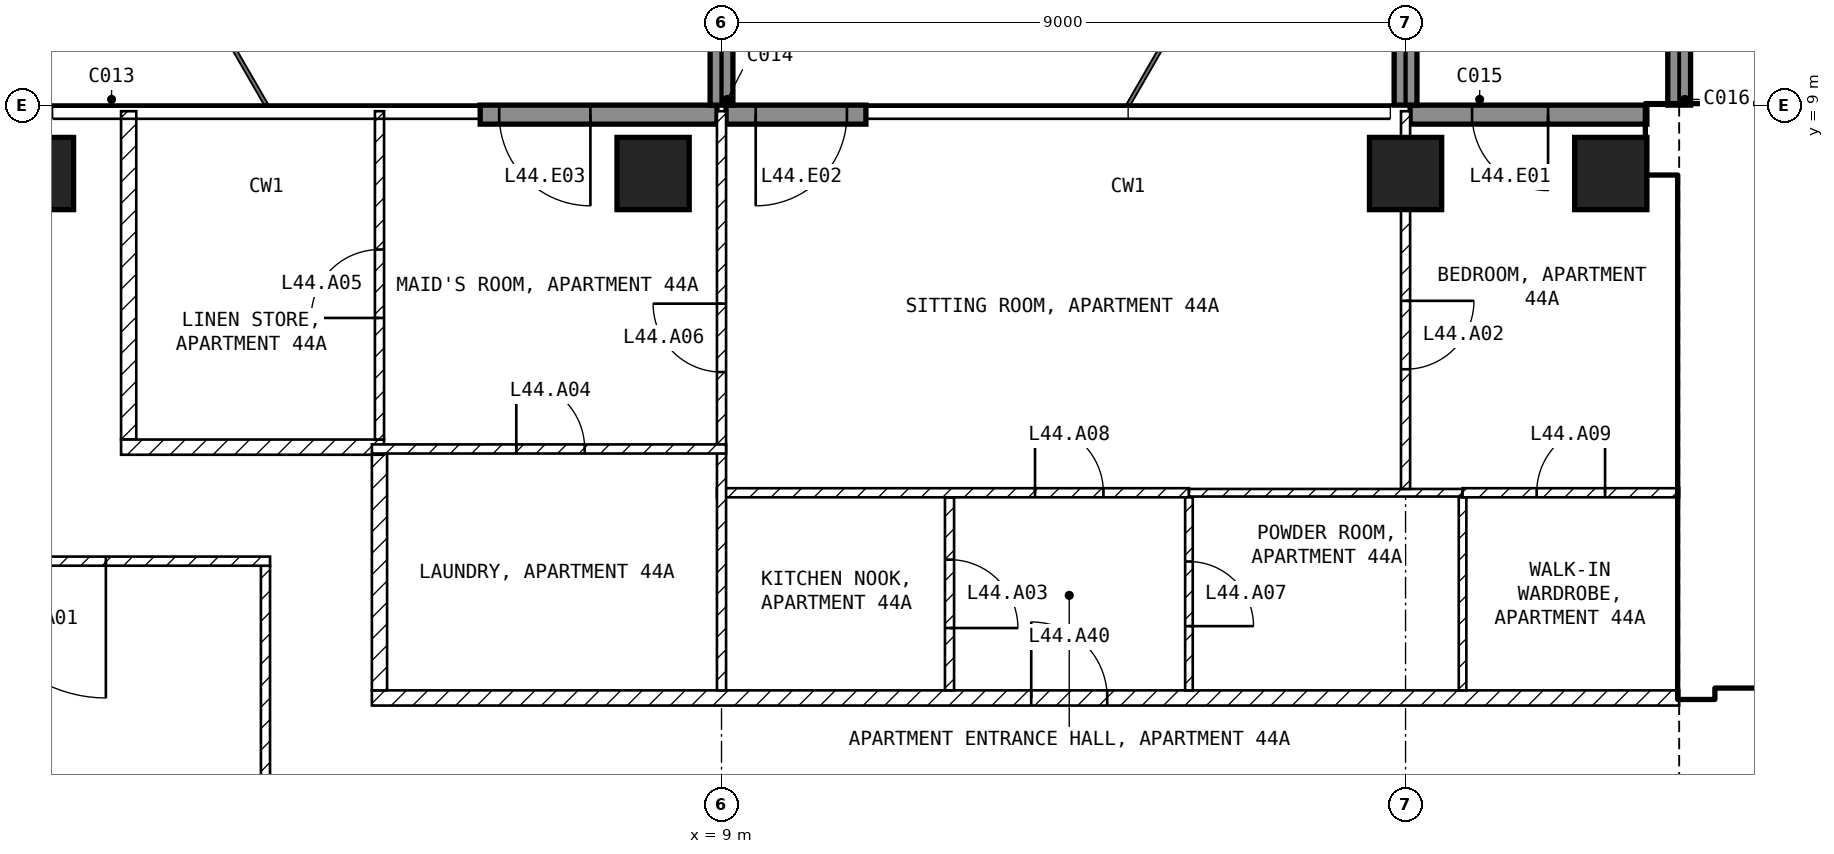
"""IFC4 building model, lengths in metres.
Left out: names, types, materials, properties, quantities, classifications, styles, units other than length and angle.
Written with IfcOpenShell. Run it as: python <this file> out.ifc"""

import sys

from ifc_helpers import new_model, si_unit, direction, frame, frame_2d, origin, origin_2d, place, context, subcontext, project, spatial, rectangle, extrude, element, fill, save


model = new_model("IFC4")
c1 = context("Model", 3, precision=1e-05, world=origin(), true_north=direction((0.0, 1.0)))
c2 = subcontext(c1, "Body", "Model", "MODEL_VIEW")
j1 = project(units=[si_unit("LENGTHUNIT", "METRE"), si_unit("PLANEANGLEUNIT", "RADIAN")], contexts=[c1])
p1 = place(None, origin())
s1 = spatial("IfcSite", under=j1, at=p1, CompositionType="ELEMENT")
p2 = place(p1, origin())
s2 = spatial("IfcBuilding", under=s1, at=p2, CompositionType="ELEMENT")
p3 = place(p2, frame((0.0, 0.0, 180.6)))
s3 = spatial("IfcBuildingStorey", under=s2, at=p3, CompositionType="ELEMENT", Elevation=180.6)
for number, where, z_axis, x_axis in (
    (1, (0.0, 8.1, -0.25), (0.0, 0.0, 1.0), (1.0, 0.0, 0.0)),
    (2, (8.1, 8.1, -0.25), (0.0, 0.0, 1.0), (1.0, 0.0, 0.0)),
    (3, (18.0, 8.1, -0.25), (0.0, 0.0, 1.0), (1.0, 0.0, 0.0)),
    (4, (20.7, 8.1, -0.25), (0.0, 0.0, 1.0), (1.0, 0.0, 0.0)),
):
    element("IfcColumn", number, at=place(p3, frame(where, z_axis=z_axis, x_axis=x_axis)), inside=s3, PredefinedType="COLUMN", context=c2, shape_type="SweptSolid", body=[
        extrude(rectangle(XDim=0.95, YDim=0.95, at=origin_2d()), origin(), (0.0, 0.0, 1.0), 3.5),
    ])
p4 = place(p3, frame((21.175, 8.875, 0.0), z_axis=(0.0, 0.0, 1.0), x_axis=(-1.0, 0.0, 0.0)))
e5 = element("IfcWall", 5, at=p4, inside=s3, PredefinedType="SOLIDWALL", context=c2, shape_type="SweptSolid", body=[
    extrude(rectangle(XDim=3.115, YDim=0.25, at=frame_2d((1.558, 0.0))), origin(), (0.0, 0.0, 1.0), 3.25),
])
p5 = place(p4, frame((1.3, 0.0, 0.0)))
e6 = element("IfcOpeningElement", 6, at=p5, cuts=e5, PredefinedType="OPENING", context=c2, shape_type="SweptSolid", body=[
    extrude(rectangle(XDim=1.0, YDim=2.4, at=frame_2d((0.5, 1.2))), frame((0.0, 0.135, 0.0), z_axis=(0.0, -1.0, 0.0), x_axis=(1.0, 0.0, 0.0)), (0.0, 0.0, 1.0), 0.27),
])
p6 = place(p3, frame((10.9, 8.875, 0.0), z_axis=(0.0, 0.0, 1.0), x_axis=(-1.0, 0.0, 0.0)))
e7 = element("IfcWall", 7, at=p6, inside=s3, PredefinedType="SOLIDWALL", context=c2, shape_type="SweptSolid", body=[
    extrude(rectangle(XDim=1.84, YDim=0.25, at=frame_2d((0.92, 0.0))), origin(), (0.0, 0.0, 1.0), 3.25),
])
p7 = place(p6, frame((0.25, 0.0, 0.0)))
e8 = element("IfcOpeningElement", 8, at=p7, cuts=e7, PredefinedType="OPENING", context=c2, shape_type="SweptSolid", body=[
    extrude(rectangle(XDim=1.2, YDim=2.4, at=frame_2d((0.6, 1.2))), frame((0.0, 0.135, 0.0), z_axis=(0.0, -1.0, 0.0), x_axis=(1.0, 0.0, 0.0)), (0.0, 0.0, 1.0), 0.27),
])
p8 = place(p3, frame((8.94, 8.875, 0.0), z_axis=(0.0, 0.0, 1.0), x_axis=(-1.0, 0.0, 0.0)))
e9 = element("IfcWall", 9, at=p8, inside=s3, PredefinedType="SOLIDWALL", context=c2, shape_type="SweptSolid", body=[
    extrude(rectangle(XDim=3.115, YDim=0.25, at=frame_2d((1.558, 0.0))), origin(), (0.0, 0.0, 1.0), 3.25),
])
p9 = place(p8, frame((1.665, 0.0, 0.0)))
e10 = element("IfcOpeningElement", 10, at=p9, cuts=e9, PredefinedType="OPENING", context=c2, shape_type="SweptSolid", body=[
    extrude(rectangle(XDim=1.2, YDim=2.4, at=frame_2d((0.6, 1.2))), frame((0.0, 0.135, 0.0), z_axis=(0.0, -1.0, 0.0), x_axis=(1.0, 0.0, 0.0)), (0.0, 0.0, 1.0), 0.27),
])
for number, where, z_axis, x_axis in (
    (11, (9.0, 9.0, 0.0), (0.0, 0.0, 1.0), (0.0, 1.0, 0.0)),
    (12, (18.0, 9.0, 0.0), (0.0, 0.0, 1.0), (0.0, 1.0, 0.0)),
    (13, (21.6, 9.0, 0.0), (0.0, 0.0, 1.0), (0.0, 1.0, 0.0)),
):
    element("IfcWall", number, at=place(p3, frame(where, z_axis=z_axis, x_axis=x_axis)), inside=s3, PredefinedType="SOLIDWALL", context=c2, shape_type="SweptSolid", body=[
        extrude(rectangle(XDim=2.7, YDim=0.3, at=frame_2d((1.35, 0.0))), origin(), (0.0, 0.0, 1.0), 3.25),
    ])
p10 = place(p3, frame((21.175, 8.55, 0.0), z_axis=(0.0, 0.0, 1.0), x_axis=(1.0, 0.0, 0.0)))
e14 = element("IfcWall", 14, at=p10, inside=s3, PredefinedType="SHEAR", context=c2, shape_type="SweptSolid", body=[
    extrude(rectangle(XDim=8.425, YDim=0.9, at=frame_2d((4.212, 0.0))), origin(), (0.0, 0.0, 1.0), 3.25),
])
p11 = place(p3, frame((21.825, 1.2, 0.0), z_axis=(0.0, 0.0, 1.0), x_axis=(0.0, 1.0, 0.0)))
e15 = element("IfcWall", 15, at=p11, inside=s3, PredefinedType="SHEAR", context=c2, shape_type="SweptSolid", body=[
    extrude(rectangle(XDim=6.9, YDim=0.45, at=frame_2d((3.45, 0.0))), origin(), (0.0, 0.0, 1.0), 3.25),
])
p12 = place(p3, frame((22.05, 1.45, 0.0), z_axis=(0.0, 0.0, 1.0), x_axis=(1.0, 0.0, 0.0)))
e16 = element("IfcWall", 16, at=p12, inside=s3, PredefinedType="SOLIDWALL", context=c2, shape_type="SweptSolid", body=[
    extrude(rectangle(XDim=11.15, YDim=0.2, at=frame_2d((5.575, 0.0))), origin(), (0.0, 0.0, 1.0), 3.25),
])
p13 = place(p12, frame((0.75, 0.0, 0.0)))
e17 = element("IfcOpeningElement", 17, at=p13, cuts=e16, PredefinedType="OPENING", context=c2, shape_type="SweptSolid", body=[
    extrude(rectangle(XDim=1.0, YDim=2.1, at=frame_2d((0.5, 1.05))), frame((0.0, 0.11, 0.0), z_axis=(0.0, -1.0, 0.0), x_axis=(1.0, 0.0, 0.0)), (0.0, 0.0, 1.0), 0.22),
])
p14 = place(p12, frame((3.25, 0.0, 0.0)))
e18 = element("IfcOpeningElement", 18, at=p14, cuts=e16, PredefinedType="OPENING", context=c2, shape_type="SweptSolid", body=[
    extrude(rectangle(XDim=1.0, YDim=2.1, at=frame_2d((0.5, 1.05))), frame((0.0, 0.11, 0.0), z_axis=(0.0, -1.0, 0.0), x_axis=(1.0, 0.0, 0.0)), (0.0, 0.0, 1.0), 0.22),
])
p15 = place(p12, frame((9.15, 0.0, 0.0)))
e19 = element("IfcOpeningElement", 19, at=p15, cuts=e16, PredefinedType="OPENING", context=c2, shape_type="SweptSolid", body=[
    extrude(rectangle(XDim=0.9, YDim=2.1, at=frame_2d((0.45, 1.05))), frame((0.0, 0.11, 0.0), z_axis=(0.0, -1.0, 0.0), x_axis=(1.0, 0.0, 0.0)), (0.0, 0.0, 1.0), 0.22),
])
p16 = place(p3, frame((22.05, 5.15, 0.0), z_axis=(0.0, 0.0, 1.0), x_axis=(1.0, 0.0, 0.0)))
e20 = element("IfcWall", 20, at=p16, inside=s3, PredefinedType="SOLIDWALL", context=c2, shape_type="SweptSolid", body=[
    extrude(rectangle(XDim=6.3, YDim=0.2, at=frame_2d((3.15, 0.0))), origin(), (0.0, 0.0, 1.0), 3.25),
])
p17 = place(p16, frame((0.2, 0.0, 0.0)))
e21 = element("IfcOpeningElement", 21, at=p17, cuts=e20, PredefinedType="OPENING", context=c2, shape_type="SweptSolid", body=[
    extrude(rectangle(XDim=1.0, YDim=2.1, at=frame_2d((0.5, 1.05))), frame((0.0, 0.11, 0.0), z_axis=(0.0, -1.0, 0.0), x_axis=(1.0, 0.0, 0.0)), (0.0, 0.0, 1.0), 0.22),
])
p18 = place(p3, frame((3.0, -2.94, 0.0), z_axis=(0.0, 0.0, 1.0), x_axis=(0.0, 1.0, 0.0)))
e22 = element("IfcWall", 22, at=p18, inside=s3, PredefinedType="PARTITIONING", context=c2, shape_type="SweptSolid", body=[
    extrude(rectangle(XDim=5.88, YDim=0.12, at=frame_2d((2.94, 0.0))), origin(), (0.0, 0.0, 1.0), 3.25),
])
p19 = place(p3, frame((3.06, 3.0, 0.0), z_axis=(0.0, 0.0, 1.0), x_axis=(-1.0, 0.0, 0.0)))
e23 = element("IfcWall", 23, at=p19, inside=s3, PredefinedType="PARTITIONING", context=c2, shape_type="SweptSolid", body=[
    extrude(rectangle(XDim=6.12, YDim=0.12, at=frame_2d((3.06, 0.0))), origin(), (0.0, 0.0, 1.0), 3.25),
])
p20 = place(p19, frame((2.16, 0.0, 0.0)))
e24 = element("IfcOpeningElement", 24, at=p20, cuts=e23, PredefinedType="OPENING", context=c2, shape_type="SweptSolid", body=[
    extrude(rectangle(XDim=1.8, YDim=2.1, at=frame_2d((0.9, 1.05))), frame((0.0, 0.07, 0.0), z_axis=(0.0, -1.0, 0.0), x_axis=(1.0, 0.0, 0.0)), (0.0, 0.0, 1.0), 0.14),
])
p21 = place(p3, frame((4.4, 1.2, 0.0), z_axis=(0.0, 0.0, 1.0), x_axis=(1.0, 0.0, 0.0)))
e25 = element("IfcWall", 25, at=p21, inside=s3, PredefinedType="PARTITIONING", context=c2, shape_type="SweptSolid", body=[
    extrude(rectangle(XDim=17.2, YDim=0.2, at=frame_2d((8.6, 0.0))), origin(), (0.0, 0.0, 1.0), 3.25),
])
p22 = place(p21, frame((8.675, 0.0, 0.0)))
e26 = element("IfcOpeningElement", 26, at=p22, cuts=e25, PredefinedType="OPENING", context=c2, shape_type="SweptSolid", body=[
    extrude(rectangle(XDim=1.0, YDim=2.1, at=frame_2d((0.5, 1.05))), frame((0.0, 0.11, 0.0), z_axis=(0.0, -1.0, 0.0), x_axis=(1.0, 0.0, 0.0)), (0.0, 0.0, 1.0), 0.22),
])
p23 = place(p3, frame((4.5, 4.416, 0.0), z_axis=(0.0, 0.0, 1.0), x_axis=(0.0, -1.0, 0.0)))
e27 = element("IfcWall", 27, at=p23, inside=s3, PredefinedType="PARTITIONING", context=c2, shape_type="SweptSolid", body=[
    extrude(rectangle(XDim=3.116, YDim=0.2, at=frame_2d((1.558, 0.0))), origin(), (0.0, 0.0, 1.0), 3.25),
])
p24 = place(p3, frame((1.2, 8.92, 0.0), z_axis=(0.0, 0.0, 1.0), x_axis=(0.0, -1.0, 0.0)))
e28 = element("IfcWall", 28, at=p24, inside=s3, PredefinedType="PARTITIONING", context=c2, shape_type="SweptSolid", body=[
    extrude(rectangle(XDim=4.32, YDim=0.2, at=frame_2d((2.16, 0.0))), origin(), (0.0, 0.0, 1.0), 3.25),
])
p25 = place(p3, frame((1.1, 4.5, 0.0), z_axis=(0.0, 0.0, 1.0), x_axis=(1.0, 0.0, 0.0)))
e29 = element("IfcWall", 29, at=p25, inside=s3, PredefinedType="PARTITIONING", context=c2, shape_type="SweptSolid", body=[
    extrude(rectangle(XDim=3.46, YDim=0.2, at=frame_2d((1.73, 0.0))), origin(), (0.0, 0.0, 1.0), 3.25),
])
p26 = place(p3, frame((12.0, 3.84, 0.0), z_axis=(0.0, 0.0, 1.0), x_axis=(0.0, -1.0, 0.0)))
e30 = element("IfcWall", 30, at=p26, inside=s3, PredefinedType="PARTITIONING", context=c2, shape_type="SweptSolid", body=[
    extrude(rectangle(XDim=2.54, YDim=0.12, at=frame_2d((1.27, 0.0))), origin(), (0.0, 0.0, 1.0), 3.25),
])
p27 = place(p26, frame((0.82, 0.0, 0.0)))
e31 = element("IfcOpeningElement", 31, at=p27, cuts=e30, PredefinedType="OPENING", context=c2, shape_type="SweptSolid", body=[
    extrude(rectangle(XDim=0.9, YDim=2.1, at=frame_2d((0.45, 1.05))), frame((0.0, 0.07, 0.0), z_axis=(0.0, -1.0, 0.0), x_axis=(1.0, 0.0, 0.0)), (0.0, 0.0, 1.0), 0.14),
])
p28 = place(p3, frame((8.94, 3.9, 0.0), z_axis=(0.0, 0.0, 1.0), x_axis=(1.0, 0.0, 0.0)))
e32 = element("IfcWall", 32, at=p28, inside=s3, PredefinedType="PARTITIONING", context=c2, shape_type="SweptSolid", body=[
    extrude(rectangle(XDim=6.21, YDim=0.12, at=frame_2d((3.105, 0.0))), origin(), (0.0, 0.0, 1.0), 3.25),
])
p29 = place(p28, frame((4.185, 0.0, 0.0)))
e33 = element("IfcOpeningElement", 33, at=p29, cuts=e32, PredefinedType="OPENING", context=c2, shape_type="SweptSolid", body=[
    extrude(rectangle(XDim=0.9, YDim=2.1, at=frame_2d((0.45, 1.05))), frame((0.0, 0.07, 0.0), z_axis=(0.0, -1.0, 0.0), x_axis=(1.0, 0.0, 0.0)), (0.0, 0.0, 1.0), 0.14),
])
p30 = place(p3, frame((9.0, 1.3, 0.0), z_axis=(0.0, 0.0, 1.0), x_axis=(0.0, 1.0, 0.0)))
e34 = element("IfcWall", 34, at=p30, inside=s3, PredefinedType="PARTITIONING", context=c2, shape_type="SweptSolid", body=[
    extrude(rectangle(XDim=7.62, YDim=0.12, at=frame_2d((3.81, 0.0))), origin(), (0.0, 0.0, 1.0), 3.25),
])
p31 = place(p30, frame((4.188, 0.0, 0.0)))
e35 = element("IfcOpeningElement", 35, at=p31, cuts=e34, PredefinedType="OPENING", context=c2, shape_type="SweptSolid", body=[
    extrude(rectangle(XDim=0.9, YDim=2.1, at=frame_2d((0.45, 1.05))), frame((0.0, 0.07, 0.0), z_axis=(0.0, -1.0, 0.0), x_axis=(1.0, 0.0, 0.0)), (0.0, 0.0, 1.0), 0.14),
])
p32 = place(p3, frame((15.15, 3.84, 0.0), z_axis=(0.0, 0.0, 1.0), x_axis=(0.0, -1.0, 0.0)))
e36 = element("IfcWall", 36, at=p32, inside=s3, PredefinedType="PARTITIONING", context=c2, shape_type="SweptSolid", body=[
    extrude(rectangle(XDim=2.54, YDim=0.1, at=frame_2d((1.27, 0.0))), origin(), (0.0, 0.0, 1.0), 3.25),
])
p33 = place(p32, frame((0.845, 0.0, 0.0)))
e37 = element("IfcOpeningElement", 37, at=p33, cuts=e36, PredefinedType="OPENING", context=c2, shape_type="SweptSolid", body=[
    extrude(rectangle(XDim=0.85, YDim=2.1, at=frame_2d((0.425, 1.05))), frame((0.0, 0.06, 0.0), z_axis=(0.0, -1.0, 0.0), x_axis=(1.0, 0.0, 0.0)), (0.0, 0.0, 1.0), 0.12),
])
p34 = place(p3, frame((18.75, 3.84, 0.0), z_axis=(0.0, 0.0, 1.0), x_axis=(0.0, -1.0, 0.0)))
e38 = element("IfcWall", 38, at=p34, inside=s3, PredefinedType="PARTITIONING", context=c2, shape_type="SweptSolid", body=[
    extrude(rectangle(XDim=2.54, YDim=0.1, at=frame_2d((1.27, 0.0))), origin(), (0.0, 0.0, 1.0), 3.25),
])
p35 = place(p3, frame((15.15, 3.9, 0.0), z_axis=(0.0, 0.0, 1.0), x_axis=(1.0, 0.0, 0.0)))
e39 = element("IfcWall", 39, at=p35, inside=s3, PredefinedType="PARTITIONING", context=c2, shape_type="SweptSolid", body=[
    extrude(rectangle(XDim=3.6, YDim=0.1, at=frame_2d((1.8, 0.0))), origin(), (0.0, 0.0, 1.0), 3.25),
])
p36 = place(p3, frame((18.75, 3.9, 0.0), z_axis=(0.0, 0.0, 1.0), x_axis=(1.0, 0.0, 0.0)))
e40 = element("IfcWall", 40, at=p36, inside=s3, PredefinedType="PARTITIONING", context=c2, shape_type="SweptSolid", body=[
    extrude(rectangle(XDim=2.85, YDim=0.12, at=frame_2d((1.425, 0.0))), origin(), (0.0, 0.0, 1.0), 3.25),
])
p37 = place(p36, frame((0.975, 0.0, 0.0)))
e41 = element("IfcOpeningElement", 41, at=p37, cuts=e40, PredefinedType="OPENING", context=c2, shape_type="SweptSolid", body=[
    extrude(rectangle(XDim=0.9, YDim=2.1, at=frame_2d((0.45, 1.05))), frame((0.0, 0.07, 0.0), z_axis=(0.0, -1.0, 0.0), x_axis=(1.0, 0.0, 0.0)), (0.0, 0.0, 1.0), 0.14),
])
p38 = place(p3, frame((18.0, 8.92, 0.0), z_axis=(0.0, 0.0, 1.0), x_axis=(0.0, -1.0, 0.0)))
e42 = element("IfcWall", 42, at=p38, inside=s3, PredefinedType="PARTITIONING", context=c2, shape_type="SweptSolid", body=[
    extrude(rectangle(XDim=4.97, YDim=0.12, at=frame_2d((2.485, 0.0))), origin(), (0.0, 0.0, 1.0), 2.48),
])
p39 = place(p38, frame((2.495, 0.0, 0.0)))
e43 = element("IfcOpeningElement", 43, at=p39, cuts=e42, PredefinedType="OPENING", context=c2, shape_type="SweptSolid", body=[
    extrude(rectangle(XDim=0.9, YDim=2.1, at=frame_2d((0.45, 1.05))), frame((0.0, 0.07, 0.0), z_axis=(0.0, -1.0, 0.0), x_axis=(1.0, 0.0, 0.0)), (0.0, 0.0, 1.0), 0.14),
])
p40 = place(p3, frame((4.4, 4.476, 0.0), z_axis=(0.0, 0.0, 1.0), x_axis=(1.0, 0.0, 0.0)))
e44 = element("IfcWall", 44, at=p40, inside=s3, PredefinedType="PARTITIONING", context=c2, shape_type="SweptSolid", body=[
    extrude(rectangle(XDim=4.66, YDim=0.12, at=frame_2d((2.33, 0.0))), origin(), (0.0, 0.0, 1.0), 3.25),
])
p41 = place(p40, frame((1.9, 0.0, 0.0)))
e45 = element("IfcOpeningElement", 45, at=p41, cuts=e44, PredefinedType="OPENING", context=c2, shape_type="SweptSolid", body=[
    extrude(rectangle(XDim=0.9, YDim=2.1, at=frame_2d((0.45, 1.05))), frame((0.0, 0.07, 0.0), z_axis=(0.0, -1.0, 0.0), x_axis=(1.0, 0.0, 0.0)), (0.0, 0.0, 1.0), 0.14),
])
p42 = place(p3, frame((4.5, 4.6, 0.0), z_axis=(0.0, 0.0, 1.0), x_axis=(0.0, 1.0, 0.0)))
e46 = element("IfcWall", 46, at=p42, inside=s3, PredefinedType="PARTITIONING", context=c2, shape_type="SweptSolid", body=[
    extrude(rectangle(XDim=4.32, YDim=0.12, at=frame_2d((2.16, 0.0))), origin(), (0.0, 0.0, 1.0), 3.25),
])
p43 = place(p42, frame((1.6, 0.0, 0.0)))
e47 = element("IfcOpeningElement", 47, at=p43, cuts=e46, PredefinedType="OPENING", context=c2, shape_type="SweptSolid", body=[
    extrude(rectangle(XDim=0.9, YDim=2.1, at=frame_2d((0.45, 1.05))), frame((0.0, 0.07, 0.0), z_axis=(0.0, -1.0, 0.0), x_axis=(1.0, 0.0, 0.0)), (0.0, 0.0, 1.0), 0.14),
])
p44 = place(p5, origin())
e48 = element("IfcDoor", 48, at=p44, inside=s3, OperationType="SINGLE_SWING_LEFT", PredefinedType="DOOR", context=c2, shape_type="SweptSolid", body=[
    extrude(rectangle(XDim=1.0, YDim=2.4, at=frame_2d((0.5, 1.2))), frame((0.0, 0.025, 0.0), z_axis=(0.0, -1.0, 0.0), x_axis=(1.0, 0.0, 0.0)), (0.0, 0.0, 1.0), 0.05),
])
fill(e6, e48)
p45 = place(p7, origin())
e49 = element("IfcDoor", 49, at=p45, inside=s3, OperationType="SINGLE_SWING_RIGHT", PredefinedType="DOOR", context=c2, shape_type="SweptSolid", body=[
    extrude(rectangle(XDim=1.2, YDim=2.4, at=frame_2d((0.6, 1.2))), frame((0.0, 0.025, 0.0), z_axis=(0.0, -1.0, 0.0), x_axis=(1.0, 0.0, 0.0)), (0.0, 0.0, 1.0), 0.05),
])
fill(e8, e49)
p46 = place(p9, origin())
e50 = element("IfcDoor", 50, at=p46, inside=s3, OperationType="SINGLE_SWING_LEFT", PredefinedType="DOOR", context=c2, shape_type="SweptSolid", body=[
    extrude(rectangle(XDim=1.2, YDim=2.4, at=frame_2d((0.6, 1.2))), frame((0.0, 0.025, 0.0), z_axis=(0.0, -1.0, 0.0), x_axis=(1.0, 0.0, 0.0)), (0.0, 0.0, 1.0), 0.05),
])
fill(e10, e50)
p47 = place(p17, origin())
e51 = element("IfcDoor", 51, at=p47, inside=s3, OperationType="SINGLE_SWING_LEFT", PredefinedType="DOOR", context=c2, shape_type="SweptSolid", body=[
    extrude(rectangle(XDim=1.0, YDim=2.1, at=frame_2d((0.5, 1.05))), frame((0.0, 0.025, 0.0), z_axis=(0.0, -1.0, 0.0), x_axis=(1.0, 0.0, 0.0)), (0.0, 0.0, 1.0), 0.05),
])
fill(e21, e51)
p48 = place(p20, origin())
e52 = element("IfcDoor", 52, at=p48, inside=s3, OperationType="SINGLE_SWING_LEFT", PredefinedType="DOOR", context=c2, shape_type="SweptSolid", body=[
    extrude(rectangle(XDim=1.8, YDim=2.1, at=frame_2d((0.9, 1.05))), frame((0.0, 0.025, 0.0), z_axis=(0.0, -1.0, 0.0), x_axis=(1.0, 0.0, 0.0)), (0.0, 0.0, 1.0), 0.05),
])
fill(e24, e52)
p49 = place(p39, origin())
e53 = element("IfcDoor", 53, at=p49, inside=s3, OperationType="SINGLE_SWING_LEFT", PredefinedType="DOOR", context=c2, shape_type="SweptSolid", body=[
    extrude(rectangle(XDim=0.9, YDim=2.1, at=frame_2d((0.45, 1.05))), frame((0.0, 0.025, 0.0), z_axis=(0.0, -1.0, 0.0), x_axis=(1.0, 0.0, 0.0)), (0.0, 0.0, 1.0), 0.05),
])
fill(e43, e53)
p50 = place(p27, origin())
e54 = element("IfcDoor", 54, at=p50, inside=s3, OperationType="SINGLE_SWING_RIGHT", PredefinedType="DOOR", context=c2, shape_type="SweptSolid", body=[
    extrude(rectangle(XDim=0.9, YDim=2.1, at=frame_2d((0.45, 1.05))), frame((0.0, 0.025, 0.0), z_axis=(0.0, -1.0, 0.0), x_axis=(1.0, 0.0, 0.0)), (0.0, 0.0, 1.0), 0.05),
])
fill(e31, e54)
p51 = place(p41, origin())
e55 = element("IfcDoor", 55, at=p51, inside=s3, OperationType="SINGLE_SWING_LEFT", PredefinedType="DOOR", context=c2, shape_type="SweptSolid", body=[
    extrude(rectangle(XDim=0.9, YDim=2.1, at=frame_2d((0.45, 1.05))), frame((0.0, 0.025, 0.0), z_axis=(0.0, -1.0, 0.0), x_axis=(1.0, 0.0, 0.0)), (0.0, 0.0, 1.0), 0.05),
])
fill(e45, e55)
p52 = place(p43, origin())
e56 = element("IfcDoor", 56, at=p52, inside=s3, OperationType="SINGLE_SWING_LEFT", PredefinedType="DOOR", context=c2, shape_type="SweptSolid", body=[
    extrude(rectangle(XDim=0.9, YDim=2.1, at=frame_2d((0.45, 1.05))), frame((0.0, 0.025, 0.0), z_axis=(0.0, -1.0, 0.0), x_axis=(1.0, 0.0, 0.0)), (0.0, 0.0, 1.0), 0.05),
])
fill(e47, e56)
p53 = place(p31, origin())
e57 = element("IfcDoor", 57, at=p53, inside=s3, OperationType="SINGLE_SWING_RIGHT", PredefinedType="DOOR", context=c2, shape_type="SweptSolid", body=[
    extrude(rectangle(XDim=0.9, YDim=2.1, at=frame_2d((0.45, 1.05))), frame((0.0, 0.025, 0.0), z_axis=(0.0, -1.0, 0.0), x_axis=(1.0, 0.0, 0.0)), (0.0, 0.0, 1.0), 0.05),
])
fill(e35, e57)
p54 = place(p33, origin())
e58 = element("IfcDoor", 58, at=p54, inside=s3, OperationType="SINGLE_SWING_RIGHT", PredefinedType="DOOR", context=c2, shape_type="SweptSolid", body=[
    extrude(rectangle(XDim=0.85, YDim=2.1, at=frame_2d((0.425, 1.05))), frame((0.0, 0.025, 0.0), z_axis=(0.0, -1.0, 0.0), x_axis=(1.0, 0.0, 0.0)), (0.0, 0.0, 1.0), 0.05),
])
fill(e37, e58)
p55 = place(p29, origin())
e59 = element("IfcDoor", 59, at=p55, inside=s3, OperationType="SINGLE_SWING_LEFT", PredefinedType="DOOR", context=c2, shape_type="SweptSolid", body=[
    extrude(rectangle(XDim=0.9, YDim=2.1, at=frame_2d((0.45, 1.05))), frame((0.0, 0.025, 0.0), z_axis=(0.0, -1.0, 0.0), x_axis=(1.0, 0.0, 0.0)), (0.0, 0.0, 1.0), 0.05),
])
fill(e33, e59)
p56 = place(p37, origin())
e60 = element("IfcDoor", 60, at=p56, inside=s3, OperationType="SINGLE_SWING_RIGHT", PredefinedType="DOOR", context=c2, shape_type="SweptSolid", body=[
    extrude(rectangle(XDim=0.9, YDim=2.1, at=frame_2d((0.45, 1.05))), frame((0.0, 0.025, 0.0), z_axis=(0.0, -1.0, 0.0), x_axis=(1.0, 0.0, 0.0)), (0.0, 0.0, 1.0), 0.05),
])
fill(e41, e60)
p57 = place(p22, origin())
e61 = element("IfcDoor", 61, at=p57, inside=s3, OperationType="SINGLE_SWING_LEFT", PredefinedType="DOOR", context=c2, shape_type="SweptSolid", body=[
    extrude(rectangle(XDim=1.0, YDim=2.1, at=frame_2d((0.5, 1.05))), frame((0.0, 0.025, 0.0), z_axis=(0.0, -1.0, 0.0), x_axis=(1.0, 0.0, 0.0)), (0.0, 0.0, 1.0), 0.05),
])
fill(e26, e61)
save(model, sys.argv[1])
